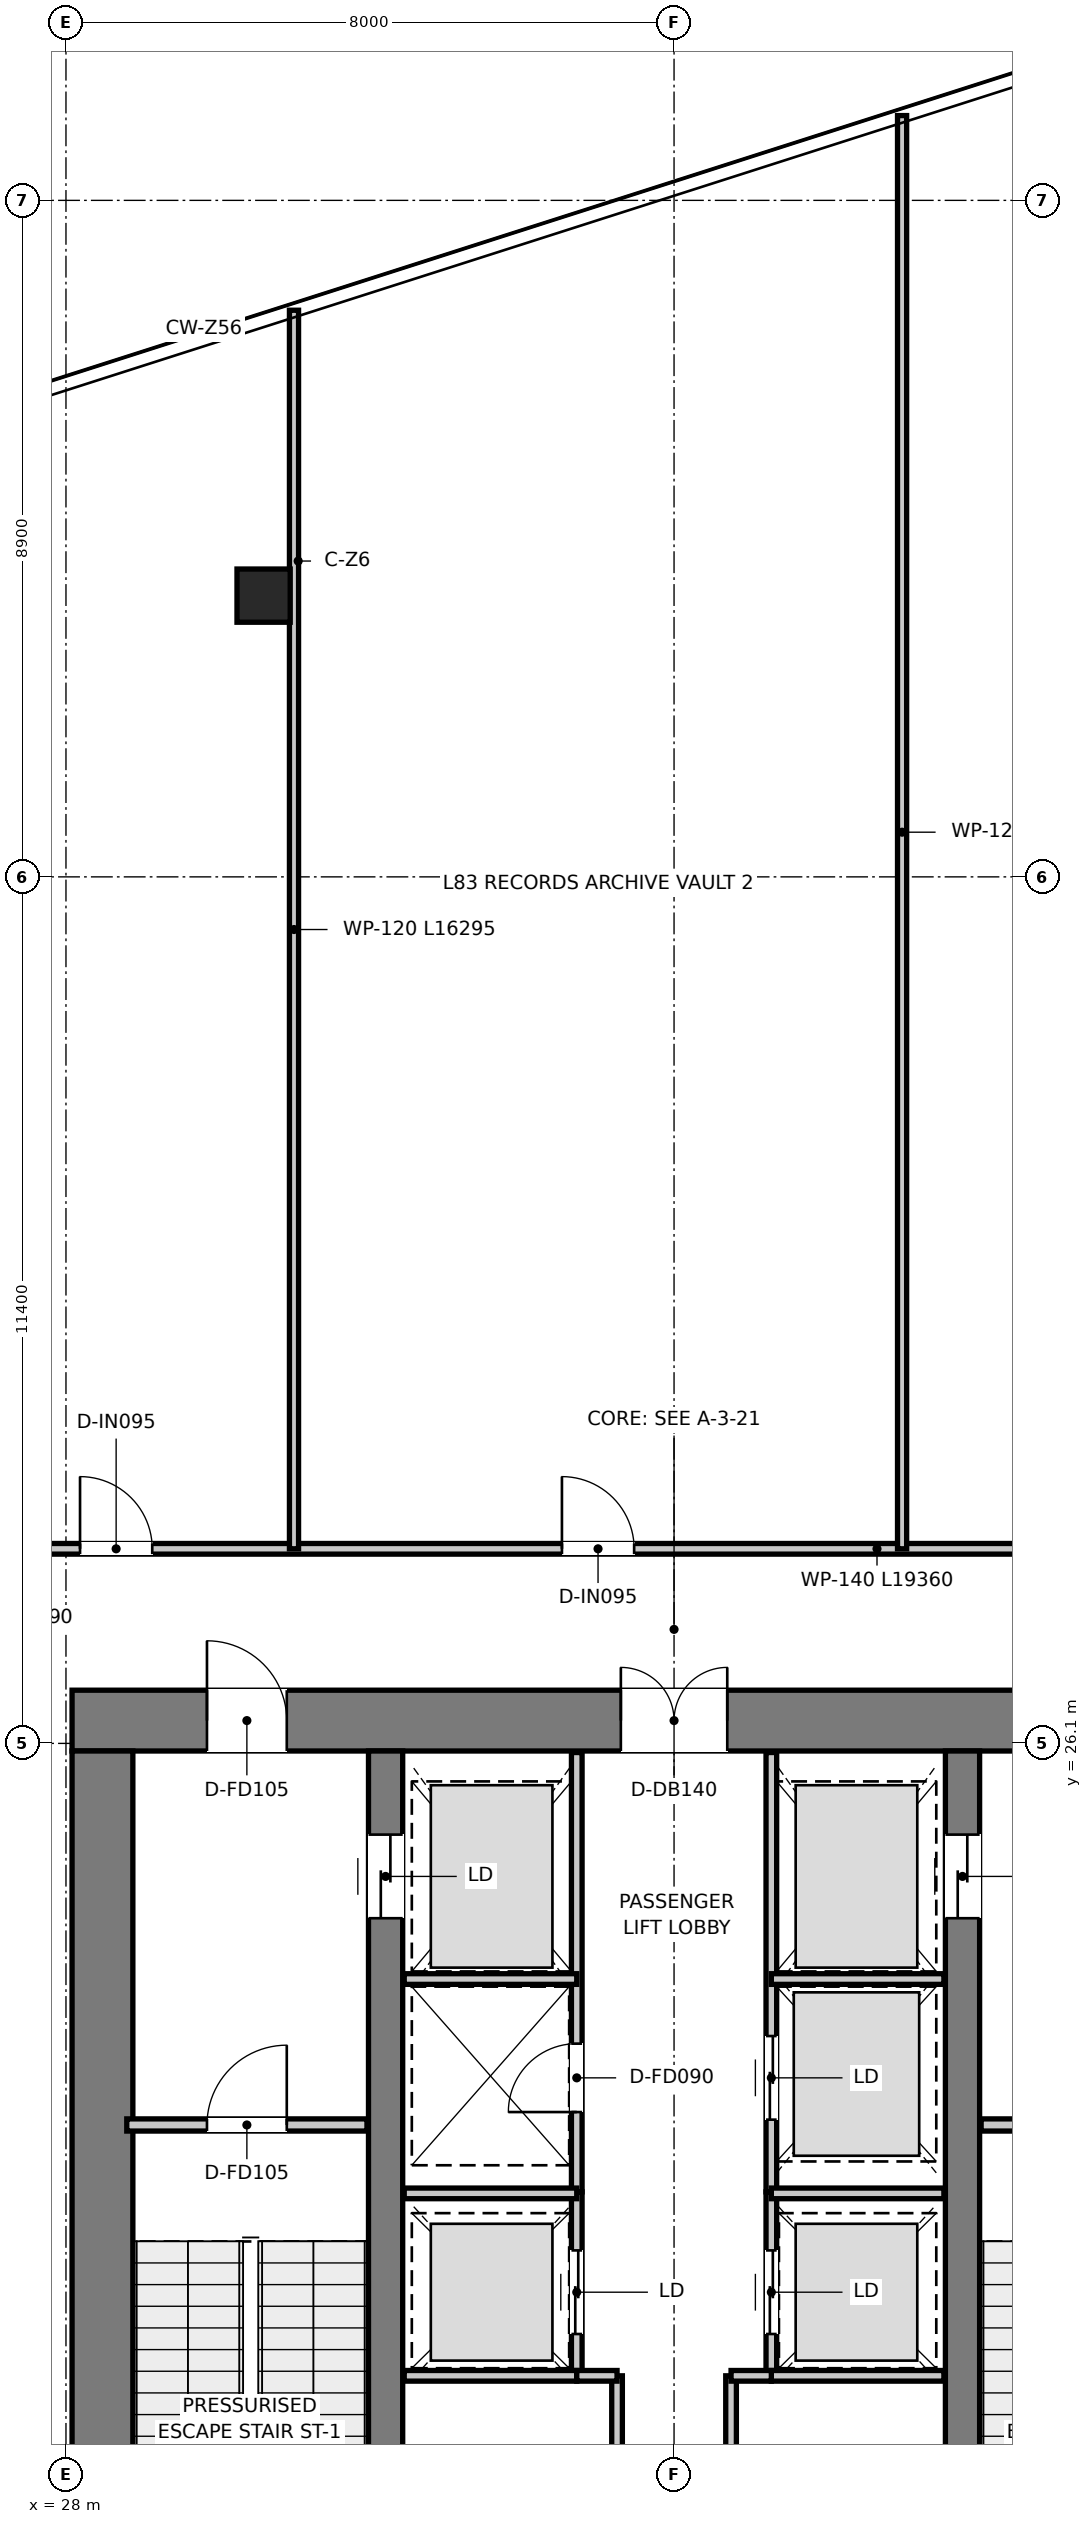
"""IFC4 building model, lengths in metres.
Left out: names, types, materials, properties, quantities, classifications, styles, units other than length and angle.
Written with IfcOpenShell. Run it as: python <this file> out.ifc"""

import sys

from ifc_helpers import new_model, si_unit, direction, frame, frame_2d, origin, origin_2d, place, context, subcontext, project, spatial, rectangle, extrude, source, transform, mapped, element, fill, save


model = new_model("IFC4")
c1 = context("Model", 3, precision=1e-05, world=origin(), true_north=direction((0.0, 1.0)))
c2 = subcontext(c1, "Body", "Model", "MODEL_VIEW")
j1 = project(units=[si_unit("LENGTHUNIT", "METRE"), si_unit("PLANEANGLEUNIT", "RADIAN")], contexts=[c1])
p1 = place(None, origin())
s1 = spatial("IfcSite", under=j1, at=p1, CompositionType="ELEMENT")
p2 = place(p1, origin())
s2 = spatial("IfcBuilding", under=s1, at=p2, CompositionType="ELEMENT")
p3 = place(p2, frame((0.0, 0.0, 339.55)))
s3 = spatial("IfcBuildingStorey", under=s2, at=p3, CompositionType="ELEMENT", Elevation=339.55)
p4 = place(p3, frame((28.08, 26.4, 0.0), z_axis=(0.0, 0.0, 1.0), x_axis=(1.0, 0.0, 0.0)))
e1 = element("IfcWall", 1, at=p4, inside=s3, PredefinedType="SHEAR", context=c2, shape_type="SweptSolid", body=[
    extrude(rectangle(XDim=15.84, YDim=0.8, at=frame_2d((7.92, 0.0))), origin(), (0.0, 0.0, 1.0), 3.95),
])
p5 = place(p4, frame((7.22, 0.0, 0.0)))
e2 = element("IfcOpeningElement", 2, at=p5, cuts=e1, PredefinedType="OPENING", context=c2, shape_type="SweptSolid", body=[
    extrude(rectangle(XDim=1.4, YDim=2.2, at=frame_2d((0.7, 1.1))), frame((0.0, 0.41, 0.0), z_axis=(0.0, -1.0, 0.0), x_axis=(1.0, 0.0, 0.0)), (0.0, 0.0, 1.0), 0.82),
])
p6 = place(p4, frame((1.775, 0.0, 0.0)))
e3 = element("IfcOpeningElement", 3, at=p6, cuts=e1, PredefinedType="OPENING", context=c2, shape_type="SweptSolid", body=[
    extrude(rectangle(XDim=1.05, YDim=2.1, at=frame_2d((0.525, 1.05))), frame((0.0, 0.41, 0.0), z_axis=(0.0, -1.0, 0.0), x_axis=(1.0, 0.0, 0.0)), (0.0, 0.0, 1.0), 0.82),
])
p7 = place(p4, frame((13.015, 0.0, 0.0)))
e4 = element("IfcOpeningElement", 4, at=p7, cuts=e1, PredefinedType="OPENING", context=c2, shape_type="SweptSolid", body=[
    extrude(rectangle(XDim=1.05, YDim=2.1, at=frame_2d((0.525, 1.05))), frame((0.0, 0.41, 0.0), z_axis=(0.0, -1.0, 0.0), x_axis=(1.0, 0.0, 0.0)), (0.0, 0.0, 1.0), 0.82),
])
p8 = place(p3, frame((28.48, 11.3, 0.0), z_axis=(0.0, 0.0, 1.0), x_axis=(0.0, 1.0, 0.0)))
e5 = element("IfcWall", 5, at=p8, inside=s3, PredefinedType="SHEAR", context=c2, shape_type="SweptSolid", body=[
    extrude(rectangle(XDim=14.7, YDim=0.8, at=frame_2d((7.35, 0.0))), origin(), (0.0, 0.0, 1.0), 3.95),
])
p9 = place(p3, frame((32.205, 13.22, 0.0), z_axis=(0.0, 0.0, 1.0), x_axis=(0.0, 1.0, 0.0)))
e6 = element("IfcWall", 6, at=p9, inside=s3, PredefinedType="SHEAR", context=c2, shape_type="SweptSolid", body=[
    extrude(rectangle(XDim=12.78, YDim=0.45, at=frame_2d((6.39, 0.0))), origin(), (0.0, 0.0, 1.0), 3.95),
])
p10 = place(p9, frame((10.58, 0.0, 0.0)))
e7 = element("IfcOpeningElement", 7, at=p10, cuts=e6, PredefinedType="OPENING", context=c2, shape_type="SweptSolid", body=[
    extrude(rectangle(XDim=1.1, YDim=2.15, at=frame_2d((0.55, 1.075))), frame((0.0, 0.235, 0.0), z_axis=(0.0, -1.0, 0.0), x_axis=(1.0, 0.0, 0.0)), (0.0, 0.0, 1.0), 0.47),
])
p11 = place(p3, frame((39.795, 13.22, 0.0), z_axis=(0.0, 0.0, 1.0), x_axis=(0.0, 1.0, 0.0)))
e8 = element("IfcWall", 8, at=p11, inside=s3, PredefinedType="SHEAR", context=c2, shape_type="SweptSolid", body=[
    extrude(rectangle(XDim=12.78, YDim=0.45, at=frame_2d((6.39, 0.0))), origin(), (0.0, 0.0, 1.0), 3.95),
])
p12 = place(p11, frame((10.58, 0.0, 0.0)))
e9 = element("IfcOpeningElement", 9, at=p12, cuts=e8, PredefinedType="OPENING", context=c2, shape_type="SweptSolid", body=[
    extrude(rectangle(XDim=1.1, YDim=2.15, at=frame_2d((0.55, 1.075))), frame((0.0, 0.235, 0.0), z_axis=(0.0, -1.0, 0.0), x_axis=(1.0, 0.0, 0.0)), (0.0, 0.0, 1.0), 0.47),
])
m1 = source(origin(), c2, "Body", "SweptSolid", [
    extrude(rectangle(XDim=0.7, YDim=0.7, at=origin_2d()), origin(), (0.0, 0.0, 1.0), 3.95),
])
p13 = place(p3, frame((30.6, 41.2, 0.0), z_axis=(0.0, 0.0, 1.0), x_axis=(1.0, 0.0, 0.0)))
e10 = element("IfcColumn", 10, at=p13, inside=s3, PredefinedType="COLUMN", context=c2, shape_type="MappedRepresentation", body=[
    mapped(m1, transform((0.0, 0.0, 0.0), x_axis=(1.0, 0.0, 0.0), y_axis=(0.0, 1.0, 0.0), z_axis=(0.0, 0.0, 1.0), scale=1.0)),
])
p14 = place(p3, frame((28.8, 21.08, 0.0), z_axis=(0.0, 0.0, 1.0), x_axis=(1.0, 0.0, 0.0)))
e11 = element("IfcWall", 11, at=p14, inside=s3, PredefinedType="PARTITIONING", context=c2, shape_type="SweptSolid", body=[
    extrude(rectangle(XDim=3.16, YDim=0.16, at=frame_2d((1.58, 0.0))), origin(), (0.0, 0.0, 1.0), 3.67),
])
p15 = place(p14, frame((1.055, 0.0, 0.0)))
e12 = element("IfcOpeningElement", 12, at=p15, cuts=e11, PredefinedType="OPENING", context=c2, shape_type="SweptSolid", body=[
    extrude(rectangle(XDim=1.05, YDim=2.1, at=frame_2d((0.525, 1.05))), frame((0.0, 0.09, 0.0), z_axis=(0.0, -1.0, 0.0), x_axis=(1.0, 0.0, 0.0)), (0.0, 0.0, 1.0), 0.18),
])
p16 = place(p3, frame((40.04, 21.08, 0.0), z_axis=(0.0, 0.0, 1.0), x_axis=(1.0, 0.0, 0.0)))
e13 = element("IfcWall", 13, at=p16, inside=s3, PredefinedType="PARTITIONING", context=c2, shape_type="SweptSolid", body=[
    extrude(rectangle(XDim=3.16, YDim=0.16, at=frame_2d((1.58, 0.0))), origin(), (0.0, 0.0, 1.0), 3.67),
])
p17 = place(p16, frame((1.055, 0.0, 0.0)))
e14 = element("IfcOpeningElement", 14, at=p17, cuts=e13, PredefinedType="OPENING", context=c2, shape_type="SweptSolid", body=[
    extrude(rectangle(XDim=1.05, YDim=2.1, at=frame_2d((0.525, 1.05))), frame((0.0, 0.09, 0.0), z_axis=(0.0, -1.0, 0.0), x_axis=(1.0, 0.0, 0.0)), (0.0, 0.0, 1.0), 0.18),
])
p18 = place(p3, frame((34.72, 20.2, 0.0), z_axis=(0.0, 0.0, 1.0), x_axis=(0.0, 1.0, 0.0)))
e15 = element("IfcWall", 15, at=p18, inside=s3, PredefinedType="PARTITIONING", context=c2, shape_type="SweptSolid", body=[
    extrude(rectangle(XDim=5.78, YDim=0.14, at=frame_2d((2.89, 0.0))), origin(), (0.0, 0.0, 1.0), 2.82),
])
p19 = place(p18, frame((1.05, 0.0, 0.0)))
e16 = element("IfcOpeningElement", 16, at=p19, cuts=e15, PredefinedType="OPENING", context=c2, shape_type="SweptSolid", body=[
    extrude(rectangle(XDim=0.9, YDim=2.1, at=frame_2d((0.45, 1.05))), frame((0.0, 0.08, 0.0), z_axis=(0.0, -1.0, 0.0), x_axis=(1.0, 0.0, 0.0)), (0.0, 0.0, 1.0), 0.16),
])
p20 = place(p3, frame((37.28, 20.2, 0.0), z_axis=(0.0, 0.0, 1.0), x_axis=(0.0, 1.0, 0.0)))
e17 = element("IfcWall", 17, at=p20, inside=s3, PredefinedType="PARTITIONING", context=c2, shape_type="SweptSolid", body=[
    extrude(rectangle(XDim=5.78, YDim=0.14, at=frame_2d((2.89, 0.0))), origin(), (0.0, 0.0, 1.0), 2.82),
])
p21 = place(p20, frame((0.95, 0.0, 0.0)))
e18 = element("IfcOpeningElement", 18, at=p21, cuts=e17, PredefinedType="OPENING", context=c2, shape_type="SweptSolid", body=[
    extrude(rectangle(XDim=1.1, YDim=2.15, at=frame_2d((0.55, 1.075))), frame((0.0, 0.08, 0.0), z_axis=(0.0, -1.0, 0.0), x_axis=(1.0, 0.0, 0.0)), (0.0, 0.0, 1.0), 0.16),
])
for number, where, z_axis, x_axis in (
    (19, (32.45, 23.0, 0.0), (0.0, 0.0, 1.0), (1.0, 0.0, 0.0)),
    (20, (37.28, 23.0, 0.0), (0.0, 0.0, 1.0), (1.0, 0.0, 0.0)),
):
    element("IfcWall", number, at=place(p3, frame(where, z_axis=z_axis, x_axis=x_axis)), inside=s3, PredefinedType="PARTITIONING", context=c2, shape_type="SweptSolid", body=[
        extrude(rectangle(XDim=2.27, YDim=0.14, at=frame_2d((1.135, 0.0))), origin(), (0.0, 0.0, 1.0), 2.82),
    ])
p22 = place(p3, frame((34.72, 17.78, 0.0), z_axis=(0.0, 0.0, 1.0), x_axis=(0.0, 1.0, 0.0)))
e21 = element("IfcWall", 21, at=p22, inside=s3, PredefinedType="PARTITIONING", context=c2, shape_type="SweptSolid", body=[
    extrude(rectangle(XDim=2.42, YDim=0.14, at=frame_2d((1.21, 0.0))), origin(), (0.0, 0.0, 1.0), 3.67),
])
p23 = place(p22, frame((0.55, 0.0, 0.0)))
e22 = element("IfcOpeningElement", 22, at=p23, cuts=e21, PredefinedType="OPENING", context=c2, shape_type="SweptSolid", body=[
    extrude(rectangle(XDim=1.1, YDim=2.15, at=frame_2d((0.55, 1.075))), frame((0.0, 0.08, 0.0), z_axis=(0.0, -1.0, 0.0), x_axis=(1.0, 0.0, 0.0)), (0.0, 0.0, 1.0), 0.16),
])
p24 = place(p3, frame((37.28, 17.78, 0.0), z_axis=(0.0, 0.0, 1.0), x_axis=(0.0, 1.0, 0.0)))
e23 = element("IfcWall", 23, at=p24, inside=s3, PredefinedType="PARTITIONING", context=c2, shape_type="SweptSolid", body=[
    extrude(rectangle(XDim=2.42, YDim=0.14, at=frame_2d((1.21, 0.0))), origin(), (0.0, 0.0, 1.0), 3.67),
])
p25 = place(p24, frame((0.55, 0.0, 0.0)))
e24 = element("IfcOpeningElement", 24, at=p25, cuts=e23, PredefinedType="OPENING", context=c2, shape_type="SweptSolid", body=[
    extrude(rectangle(XDim=1.1, YDim=2.15, at=frame_2d((0.55, 1.075))), frame((0.0, 0.08, 0.0), z_axis=(0.0, -1.0, 0.0), x_axis=(1.0, 0.0, 0.0)), (0.0, 0.0, 1.0), 0.16),
])
for number, where, z_axis, x_axis in (
    (25, (32.45, 17.78, 0.0), (0.0, 0.0, 1.0), (1.0, 0.0, 0.0)),
    (26, (32.45, 20.18, 0.0), (0.0, 0.0, 1.0), (1.0, 0.0, 0.0)),
    (27, (37.28, 17.78, 0.0), (0.0, 0.0, 1.0), (1.0, 0.0, 0.0)),
    (28, (37.28, 20.18, 0.0), (0.0, 0.0, 1.0), (1.0, 0.0, 0.0)),
):
    element("IfcWall", number, at=place(p3, frame(where, z_axis=z_axis, x_axis=x_axis)), inside=s3, PredefinedType="PARTITIONING", context=c2, shape_type="SweptSolid", body=[
        extrude(rectangle(XDim=2.27, YDim=0.14, at=frame_2d((1.135, 0.0))), origin(), (0.0, 0.0, 1.0), 3.67),
    ])
p26 = place(p3, frame((35.25, 13.22, 0.0), z_axis=(0.0, 0.0, 1.0), x_axis=(0.0, 1.0, 0.0)))
e29 = element("IfcWall", 29, at=p26, inside=s3, PredefinedType="PARTITIONING", context=c2, shape_type="SweptSolid", body=[
    extrude(rectangle(XDim=4.56, YDim=0.14, at=frame_2d((2.28, 0.0))), origin(), (0.0, 0.0, 1.0), 3.67),
])
p27 = place(p26, frame((1.93, 0.0, 0.0)))
e30 = element("IfcOpeningElement", 30, at=p27, cuts=e29, PredefinedType="OPENING", context=c2, shape_type="SweptSolid", body=[
    extrude(rectangle(XDim=0.9, YDim=2.1, at=frame_2d((0.45, 1.05))), frame((0.0, 0.08, 0.0), z_axis=(0.0, -1.0, 0.0), x_axis=(1.0, 0.0, 0.0)), (0.0, 0.0, 1.0), 0.16),
])
p28 = place(p3, frame((34.72, 17.78, 0.0), z_axis=(0.0, 0.0, 1.0), x_axis=(1.0, 0.0, 0.0)))
e31 = element("IfcWall", 31, at=p28, inside=s3, PredefinedType="PARTITIONING", context=c2, shape_type="SweptSolid", body=[
    extrude(rectangle(XDim=0.53, YDim=0.14, at=frame_2d((0.265, 0.0))), origin(), (0.0, 0.0, 1.0), 3.67),
])
p29 = place(p3, frame((36.75, 13.22, 0.0), z_axis=(0.0, 0.0, 1.0), x_axis=(0.0, 1.0, 0.0)))
e32 = element("IfcWall", 32, at=p29, inside=s3, PredefinedType="PARTITIONING", context=c2, shape_type="SweptSolid", body=[
    extrude(rectangle(XDim=4.56, YDim=0.14, at=frame_2d((2.28, 0.0))), origin(), (0.0, 0.0, 1.0), 3.67),
])
p30 = place(p29, frame((1.93, 0.0, 0.0)))
e33 = element("IfcOpeningElement", 33, at=p30, cuts=e32, PredefinedType="OPENING", context=c2, shape_type="SweptSolid", body=[
    extrude(rectangle(XDim=0.9, YDim=2.1, at=frame_2d((0.45, 1.05))), frame((0.0, 0.08, 0.0), z_axis=(0.0, -1.0, 0.0), x_axis=(1.0, 0.0, 0.0)), (0.0, 0.0, 1.0), 0.16),
])
p31 = place(p3, frame((36.75, 17.78, 0.0), z_axis=(0.0, 0.0, 1.0), x_axis=(1.0, 0.0, 0.0)))
e34 = element("IfcWall", 34, at=p31, inside=s3, PredefinedType="PARTITIONING", context=c2, shape_type="SweptSolid", body=[
    extrude(rectangle(XDim=0.53, YDim=0.14, at=frame_2d((0.265, 0.0))), origin(), (0.0, 0.0, 1.0), 3.67),
])
p32 = place(p3, frame((26.32, 28.66, 0.0), z_axis=(0.0, 0.0, 1.0), x_axis=(1.0, 0.0, 0.0)))
e35 = element("IfcWall", 35, at=p32, inside=s3, PredefinedType="PARTITIONING", context=c2, shape_type="SweptSolid", body=[
    extrude(rectangle(XDim=19.36, YDim=0.14, at=frame_2d((9.68, 0.0))), origin(), (0.0, 0.0, 1.0), 3.18),
])
p33 = place(p32, frame((1.865, 0.0, 0.0)))
e36 = element("IfcOpeningElement", 36, at=p33, cuts=e35, PredefinedType="OPENING", context=c2, shape_type="SweptSolid", body=[
    extrude(rectangle(XDim=0.95, YDim=2.1, at=frame_2d((0.475, 1.05))), frame((0.0, 0.08, 0.0), z_axis=(0.0, -1.0, 0.0), x_axis=(1.0, 0.0, 0.0)), (0.0, 0.0, 1.0), 0.16),
])
p34 = place(p32, frame((8.205, 0.0, 0.0)))
e37 = element("IfcOpeningElement", 37, at=p34, cuts=e35, PredefinedType="OPENING", context=c2, shape_type="SweptSolid", body=[
    extrude(rectangle(XDim=0.95, YDim=2.1, at=frame_2d((0.475, 1.05))), frame((0.0, 0.08, 0.0), z_axis=(0.0, -1.0, 0.0), x_axis=(1.0, 0.0, 0.0)), (0.0, 0.0, 1.0), 0.16),
])
p35 = place(p32, frame((15.545, 0.0, 0.0)))
e38 = element("IfcOpeningElement", 38, at=p35, cuts=e35, PredefinedType="OPENING", context=c2, shape_type="SweptSolid", body=[
    extrude(rectangle(XDim=0.95, YDim=2.1, at=frame_2d((0.475, 1.05))), frame((0.0, 0.08, 0.0), z_axis=(0.0, -1.0, 0.0), x_axis=(1.0, 0.0, 0.0)), (0.0, 0.0, 1.0), 0.16),
])
p36 = place(p3, frame((31.0, 28.66, 0.0), z_axis=(0.0, 0.0, 1.0), x_axis=(0.0, 1.0, 0.0)))
e39 = element("IfcWall", 39, at=p36, inside=s3, PredefinedType="PARTITIONING", context=c2, shape_type="SweptSolid", body=[
    extrude(rectangle(XDim=16.295, YDim=0.12, at=frame_2d((8.147, 0.0))), origin(), (0.0, 0.0, 1.0), 3.13),
])
p37 = place(p3, frame((39.0, 28.66, 0.0), z_axis=(0.0, 0.0, 1.0), x_axis=(0.0, 1.0, 0.0)))
e40 = element("IfcWall", 40, at=p37, inside=s3, PredefinedType="PARTITIONING", context=c2, shape_type="SweptSolid", body=[
    extrude(rectangle(XDim=18.855, YDim=0.12, at=frame_2d((9.428, 0.0))), origin(), (0.0, 0.0, 1.0), 3.13),
])
p38 = place(p15, origin())
e41 = element("IfcDoor", 41, at=p38, inside=s3, OperationType="SINGLE_SWING_RIGHT", PredefinedType="DOOR", context=c2, shape_type="SweptSolid", body=[
    extrude(rectangle(XDim=1.05, YDim=2.1, at=frame_2d((0.525, 1.05))), frame((0.0, 0.025, 0.0), z_axis=(0.0, -1.0, 0.0), x_axis=(1.0, 0.0, 0.0)), (0.0, 0.0, 1.0), 0.05),
])
fill(e12, e41)
p39 = place(p5, origin())
e42 = element("IfcDoor", 42, at=p39, inside=s3, OperationType="DOUBLE_DOOR_SINGLE_SWING", PredefinedType="DOOR", context=c2, shape_type="SweptSolid", body=[
    extrude(rectangle(XDim=1.4, YDim=2.2, at=frame_2d((0.7, 1.1))), frame((0.0, 0.025, 0.0), z_axis=(0.0, -1.0, 0.0), x_axis=(1.0, 0.0, 0.0)), (0.0, 0.0, 1.0), 0.05),
])
fill(e2, e42)
p40 = place(p6, origin())
e43 = element("IfcDoor", 43, at=p40, inside=s3, OperationType="SINGLE_SWING_LEFT", PredefinedType="DOOR", context=c2, shape_type="SweptSolid", body=[
    extrude(rectangle(XDim=1.05, YDim=2.1, at=frame_2d((0.525, 1.05))), frame((0.0, 0.025, 0.0), z_axis=(0.0, -1.0, 0.0), x_axis=(1.0, 0.0, 0.0)), (0.0, 0.0, 1.0), 0.05),
])
fill(e3, e43)
p41 = place(p10, origin())
e44 = element("IfcDoor", 44, at=p41, inside=s3, OperationType="DOUBLE_DOOR_SLIDING", PredefinedType="DOOR", context=c2, shape_type="SweptSolid", body=[
    extrude(rectangle(XDim=1.1, YDim=2.15, at=frame_2d((0.55, 1.075))), frame((0.0, 0.025, 0.0), z_axis=(0.0, -1.0, 0.0), x_axis=(1.0, 0.0, 0.0)), (0.0, 0.0, 1.0), 0.05),
])
fill(e7, e44)
p42 = place(p12, origin())
e45 = element("IfcDoor", 45, at=p42, inside=s3, OperationType="DOUBLE_DOOR_SLIDING", PredefinedType="DOOR", context=c2, shape_type="SweptSolid", body=[
    extrude(rectangle(XDim=1.1, YDim=2.15, at=frame_2d((0.55, 1.075))), frame((0.0, 0.025, 0.0), z_axis=(0.0, -1.0, 0.0), x_axis=(1.0, 0.0, 0.0)), (0.0, 0.0, 1.0), 0.05),
])
fill(e9, e45)
p43 = place(p19, origin())
e46 = element("IfcDoor", 46, at=p43, inside=s3, OperationType="SINGLE_SWING_LEFT", PredefinedType="DOOR", context=c2, shape_type="SweptSolid", body=[
    extrude(rectangle(XDim=0.9, YDim=2.1, at=frame_2d((0.45, 1.05))), frame((0.0, 0.025, 0.0), z_axis=(0.0, -1.0, 0.0), x_axis=(1.0, 0.0, 0.0)), (0.0, 0.0, 1.0), 0.05),
])
fill(e16, e46)
p44 = place(p21, origin())
e47 = element("IfcDoor", 47, at=p44, inside=s3, OperationType="DOUBLE_DOOR_SLIDING", PredefinedType="DOOR", context=c2, shape_type="SweptSolid", body=[
    extrude(rectangle(XDim=1.1, YDim=2.15, at=frame_2d((0.55, 1.075))), frame((0.0, 0.025, 0.0), z_axis=(0.0, -1.0, 0.0), x_axis=(1.0, 0.0, 0.0)), (0.0, 0.0, 1.0), 0.05),
])
fill(e18, e47)
p45 = place(p23, origin())
e48 = element("IfcDoor", 48, at=p45, inside=s3, OperationType="DOUBLE_DOOR_SLIDING", PredefinedType="DOOR", context=c2, shape_type="SweptSolid", body=[
    extrude(rectangle(XDim=1.1, YDim=2.15, at=frame_2d((0.55, 1.075))), frame((0.0, 0.025, 0.0), z_axis=(0.0, -1.0, 0.0), x_axis=(1.0, 0.0, 0.0)), (0.0, 0.0, 1.0), 0.05),
])
fill(e22, e48)
p46 = place(p25, origin())
e49 = element("IfcDoor", 49, at=p46, inside=s3, OperationType="DOUBLE_DOOR_SLIDING", PredefinedType="DOOR", context=c2, shape_type="SweptSolid", body=[
    extrude(rectangle(XDim=1.1, YDim=2.15, at=frame_2d((0.55, 1.075))), frame((0.0, 0.025, 0.0), z_axis=(0.0, -1.0, 0.0), x_axis=(1.0, 0.0, 0.0)), (0.0, 0.0, 1.0), 0.05),
])
fill(e24, e49)
p47 = place(p33, origin())
e50 = element("IfcDoor", 50, at=p47, inside=s3, OperationType="SINGLE_SWING_LEFT", PredefinedType="DOOR", context=c2, shape_type="SweptSolid", body=[
    extrude(rectangle(XDim=0.95, YDim=2.1, at=frame_2d((0.475, 1.05))), frame((0.0, 0.025, 0.0), z_axis=(0.0, -1.0, 0.0), x_axis=(1.0, 0.0, 0.0)), (0.0, 0.0, 1.0), 0.05),
])
fill(e36, e50)
p48 = place(p34, origin())
e51 = element("IfcDoor", 51, at=p48, inside=s3, OperationType="SINGLE_SWING_LEFT", PredefinedType="DOOR", context=c2, shape_type="SweptSolid", body=[
    extrude(rectangle(XDim=0.95, YDim=2.1, at=frame_2d((0.475, 1.05))), frame((0.0, 0.025, 0.0), z_axis=(0.0, -1.0, 0.0), x_axis=(1.0, 0.0, 0.0)), (0.0, 0.0, 1.0), 0.05),
])
fill(e37, e51)
save(model, sys.argv[1])
